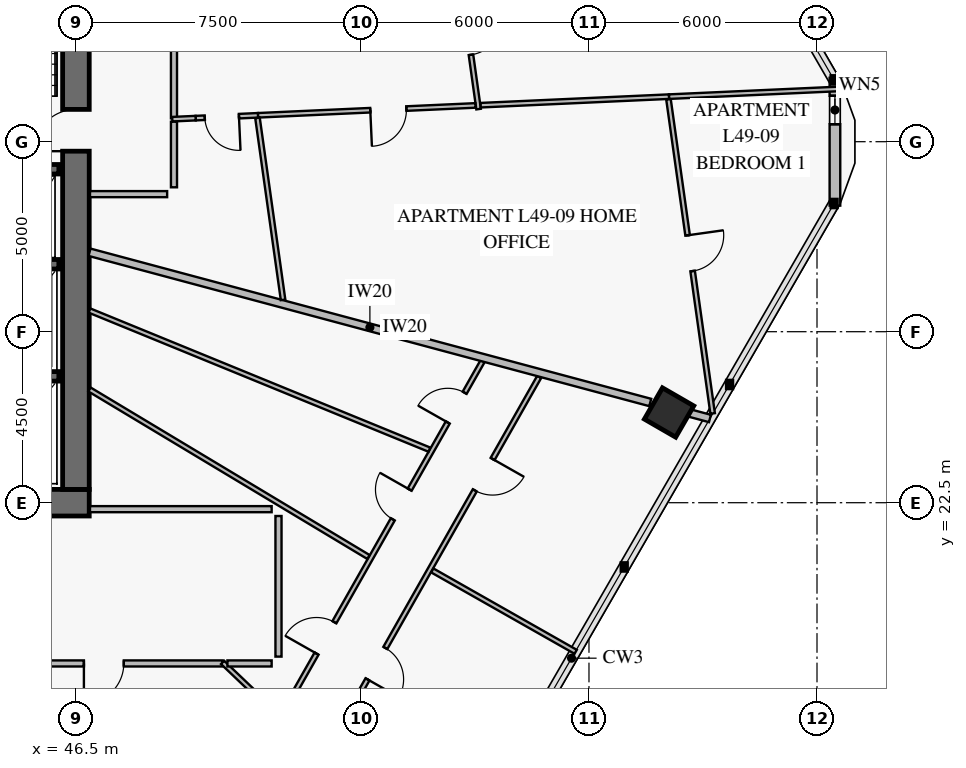
"""IFC4 building model, lengths in metres.
Left out: names, types, materials, properties, quantities, classifications, styles, units other than length and angle.
Written with IfcOpenShell. Run it as: python <this file> out.ifc"""

import sys

from ifc_helpers import new_model, si_unit, direction, frame, frame_2d, origin, origin_2d, place, context, subcontext, project, spatial, rectangle, extrude, element, fill, save


model = new_model("IFC4")
c1 = context("Model", 3, precision=1e-05, world=origin(), true_north=direction((0.0, 1.0)))
c2 = subcontext(c1, "Body", "Model", "MODEL_VIEW")
j1 = project(units=[si_unit("LENGTHUNIT", "METRE"), si_unit("PLANEANGLEUNIT", "RADIAN")], contexts=[c1])
p1 = place(None, origin())
s1 = spatial("IfcSite", under=j1, at=p1, CompositionType="ELEMENT")
p2 = place(p1, origin())
s2 = spatial("IfcBuilding", under=s1, at=p2, CompositionType="ELEMENT")
p3 = place(p2, frame((0.0, 0.0, 196.0)))
s3 = spatial("IfcBuildingStorey", under=s2, at=p3, CompositionType="ELEMENT", Elevation=196.0)
p4 = place(p3, frame((37.35, 22.5, 0.0), z_axis=(0.0, 0.0, 1.0), x_axis=(1.0, 0.0, 0.0)))
e1 = element("IfcWall", 1, at=p4, inside=s3, PredefinedType="SHEAR", context=c2, shape_type="SweptSolid", body=[
    extrude(rectangle(XDim=9.5, YDim=0.7, at=frame_2d((4.75, 0.0))), origin(), (0.0, 0.0, 1.0), 3.8),
])
p5 = place(p4, frame((3.95, 0.0, 0.0)))
e2 = element("IfcOpeningElement", 2, at=p5, cuts=e1, PredefinedType="OPENING", context=c2, shape_type="SweptSolid", body=[
    extrude(rectangle(XDim=1.5, YDim=2.15, at=frame_2d((0.75, 1.075))), frame((0.0, 0.362, 0.0), z_axis=(0.0, -1.0, 0.0), x_axis=(1.0, 0.0, 0.0)), (0.0, 0.0, 1.0), 0.724),
])
p6 = place(p3, frame((46.5, 22.85, 0.0), z_axis=(0.0, 0.0, 1.0), x_axis=(0.0, 1.0, 0.0)))
e3 = element("IfcWall", 3, at=p6, inside=s3, PredefinedType="SHEAR", context=c2, shape_type="SweptSolid", body=[
    extrude(rectangle(XDim=18.3, YDim=0.7, at=frame_2d((9.15, 0.0))), origin(), (0.0, 0.0, 1.0), 3.8),
])
p7 = place(p6, frame((8.9, 0.0, 0.0)))
e4 = element("IfcOpeningElement", 4, at=p7, cuts=e3, PredefinedType="OPENING", context=c2, shape_type="SweptSolid", body=[
    extrude(rectangle(XDim=1.1, YDim=2.15, at=frame_2d((0.55, 1.075))), frame((0.0, 0.362, 0.0), z_axis=(0.0, -1.0, 0.0), x_axis=(1.0, 0.0, 0.0)), (0.0, 0.0, 1.0), 0.724),
])
p8 = place(p3, frame((62.108, 24.874, 0.0), z_axis=(0.0, 0.0, 1.0), x_axis=(0.5, 0.866025403784, 0.0)))
e5 = element("IfcColumn", 5, at=p8, inside=s3, PredefinedType="COLUMN", context=c2, shape_type="SweptSolid", body=[
    extrude(rectangle(XDim=0.95, YDim=0.95, at=origin_2d()), origin(), (0.0, 0.0, 1.0), 3.55),
])
p9 = place(p3, frame((66.472, 33.683, 0.0), z_axis=(0.0, 0.0, 1.0), x_axis=(0.0, -1.0, 0.0)))
e6 = element("IfcWall", 6, at=p9, inside=s3, PredefinedType="SOLIDWALL", context=c2, shape_type="SweptSolid", body=[
    extrude(rectangle(XDim=3.365, YDim=0.28, at=frame_2d((1.683, 0.0))), origin(), (0.0, 0.0, 1.0), 3.55),
])
p10 = place(p9, frame((0.473, 0.0, 0.85)))
e7 = element("IfcOpeningElement", 7, at=p10, cuts=e6, PredefinedType="OPENING", context=c2, shape_type="SweptSolid", body=[
    extrude(rectangle(XDim=0.75, YDim=1.5, at=frame_2d((0.375, 0.75))), frame((0.0, 0.152, 0.0), z_axis=(0.0, -1.0, 0.0), x_axis=(1.0, 0.0, 0.0)), (0.0, 0.0, 1.0), 0.304),
])
p11 = place(p3, frame((25.95, 31.275, 0.0), z_axis=(0.0, 0.0, 1.0), x_axis=(1.0, 0.0, 0.0)))
e8 = element("IfcWall", 8, at=p11, inside=s3, PredefinedType="SOLIDWALL", context=c2, shape_type="SweptSolid", body=[
    extrude(rectangle(XDim=20.1, YDim=0.25, at=frame_2d((10.05, 0.0))), origin(), (0.0, 0.0, 1.0), 3.8),
])
p12 = place(p11, frame((2.6, 0.0, 0.0)))
e9 = element("IfcOpeningElement", 9, at=p12, cuts=e8, PredefinedType="OPENING", context=c2, shape_type="SweptSolid", body=[
    extrude(rectangle(XDim=1.1, YDim=2.15, at=frame_2d((0.55, 1.075))), frame((0.0, 0.137, 0.0), z_axis=(0.0, -1.0, 0.0), x_axis=(1.0, 0.0, 0.0)), (0.0, 0.0, 1.0), 0.274),
])
p13 = place(p11, frame((10.6, 0.0, 0.0)))
e10 = element("IfcOpeningElement", 10, at=p13, cuts=e8, PredefinedType="OPENING", context=c2, shape_type="SweptSolid", body=[
    extrude(rectangle(XDim=1.1, YDim=2.15, at=frame_2d((0.55, 1.075))), frame((0.0, 0.137, 0.0), z_axis=(0.0, -1.0, 0.0), x_axis=(1.0, 0.0, 0.0)), (0.0, 0.0, 1.0), 0.274),
])
p14 = place(p11, frame((16.35, 0.0, 0.0)))
e11 = element("IfcOpeningElement", 11, at=p14, cuts=e8, PredefinedType="OPENING", context=c2, shape_type="SweptSolid", body=[
    extrude(rectangle(XDim=1.1, YDim=2.15, at=frame_2d((0.55, 1.075))), frame((0.0, 0.137, 0.0), z_axis=(0.0, -1.0, 0.0), x_axis=(1.0, 0.0, 0.0)), (0.0, 0.0, 1.0), 0.274),
])
for number, where, z_axis, x_axis in (
    (12, (43.8, 25.825, 0.0), (0.0, 0.0, 1.0), (1.0, 0.0, 0.0)),
    (13, (43.8, 28.775, 0.0), (0.0, 0.0, 1.0), (1.0, 0.0, 0.0)),
):
    element("IfcWall", number, at=place(p3, frame(where, z_axis=z_axis, x_axis=x_axis)), inside=s3, PredefinedType="SOLIDWALL", context=c2, shape_type="SweptSolid", body=[
        extrude(rectangle(XDim=2.25, YDim=0.25, at=frame_2d((1.125, 0.0))), origin(), (0.0, 0.0, 1.0), 3.8),
    ])
p15 = place(p3, frame((51.827, 16.758, 0.0), z_axis=(0.0, 0.0, 1.0), x_axis=(0.493634405262, 0.869669519957, 0.0)))
e14 = element("IfcWall", 14, at=p15, inside=s3, PredefinedType="PARTITIONING", context=c2, shape_type="SweptSolid", body=[
    extrude(rectangle(XDim=10.885, YDim=0.12, at=frame_2d((5.442, 0.0))), origin(), (0.0, 0.0, 1.0), 2.9),
])
p16 = place(p15, frame((2.036, 0.0, 0.0)))
e15 = element("IfcOpeningElement", 15, at=p16, cuts=e14, PredefinedType="OPENING", context=c2, shape_type="SweptSolid", body=[
    extrude(rectangle(XDim=0.95, YDim=2.1, at=frame_2d((0.475, 1.05))), frame((0.0, 0.072, 0.0), z_axis=(0.0, -1.0, 0.0), x_axis=(1.0, 0.0, 0.0)), (0.0, 0.0, 1.0), 0.144),
])
p17 = place(p15, frame((6.098, 0.0, 0.0)))
e16 = element("IfcOpeningElement", 16, at=p17, cuts=e14, PredefinedType="OPENING", context=c2, shape_type="SweptSolid", body=[
    extrude(rectangle(XDim=0.9, YDim=2.1, at=frame_2d((0.45, 1.05))), frame((0.0, 0.072, 0.0), z_axis=(0.0, -1.0, 0.0), x_axis=(1.0, 0.0, 0.0)), (0.0, 0.0, 1.0), 0.144),
])
p18 = place(p15, frame((9.029, 0.0, 0.0)))
e17 = element("IfcOpeningElement", 17, at=p18, cuts=e14, PredefinedType="OPENING", context=c2, shape_type="SweptSolid", body=[
    extrude(rectangle(XDim=0.9, YDim=2.1, at=frame_2d((0.45, 1.05))), frame((0.0, 0.072, 0.0), z_axis=(0.0, -1.0, 0.0), x_axis=(1.0, 0.0, 0.0)), (0.0, 0.0, 1.0), 0.144),
])
p19 = place(p3, frame((52.946, 15.691, 0.0), z_axis=(0.0, 0.0, 1.0), x_axis=(0.493647118533, 0.869662303635, 0.0)))
e18 = element("IfcWall", 18, at=p19, inside=s3, PredefinedType="PARTITIONING", context=c2, shape_type="SweptSolid", body=[
    extrude(rectangle(XDim=11.637, YDim=0.12, at=frame_2d((5.819, 0.0))), origin(), (0.0, 0.0, 1.0), 2.9),
])
p20 = place(p19, frame((2.484, 0.0, 0.0)))
e19 = element("IfcOpeningElement", 19, at=p20, cuts=e18, PredefinedType="OPENING", context=c2, shape_type="SweptSolid", body=[
    extrude(rectangle(XDim=0.95, YDim=2.1, at=frame_2d((0.475, 1.05))), frame((0.0, 0.072, 0.0), z_axis=(0.0, -1.0, 0.0), x_axis=(1.0, 0.0, 0.0)), (0.0, 0.0, 1.0), 0.144),
])
p21 = place(p19, frame((8.203, 0.0, 0.0)))
e20 = element("IfcOpeningElement", 20, at=p21, cuts=e18, PredefinedType="OPENING", context=c2, shape_type="SweptSolid", body=[
    extrude(rectangle(XDim=0.95, YDim=2.1, at=frame_2d((0.475, 1.05))), frame((0.0, 0.072, 0.0), z_axis=(0.0, -1.0, 0.0), x_axis=(1.0, 0.0, 0.0)), (0.0, 0.0, 1.0), 0.144),
])
p22 = place(p3, frame((44.111, 18.27, 0.0), z_axis=(0.0, 0.0, 1.0), x_axis=(1.0, 0.0, 0.0)))
e21 = element("IfcWall", 21, at=p22, inside=s3, PredefinedType="PARTITIONING", context=c2, shape_type="SweptSolid", body=[
    extrude(rectangle(XDim=6.248, YDim=0.16, at=frame_2d((3.124, 0.0))), origin(), (0.0, 0.0, 1.0), 2.9),
])
p23 = place(p22, frame((2.599, 0.0, 0.0)))
e22 = element("IfcOpeningElement", 22, at=p23, cuts=e21, PredefinedType="OPENING", context=c2, shape_type="SweptSolid", body=[
    extrude(rectangle(XDim=1.05, YDim=2.15, at=frame_2d((0.525, 1.075))), frame((0.0, 0.092, 0.0), z_axis=(0.0, -1.0, 0.0), x_axis=(1.0, 0.0, 0.0)), (0.0, 0.0, 1.0), 0.184),
])
p24 = place(p3, frame((57.095, 32.858, 0.0), z_axis=(0.0, 0.0, 1.0), x_axis=(-0.13917519047, 0.990267775078, 0.0)))
e23 = element("IfcWall", 23, at=p24, inside=s3, PredefinedType="PARTITIONING", context=c2, shape_type="SweptSolid", body=[
    extrude(rectangle(XDim=10.897, YDim=0.12, at=frame_2d((5.448, 0.0))), origin(), (0.0, 0.0, 1.0), 2.9),
])
p25 = place(p24, frame((1.443, 0.0, 0.0)))
e24 = element("IfcOpeningElement", 24, at=p25, cuts=e23, PredefinedType="OPENING", context=c2, shape_type="SweptSolid", body=[
    extrude(rectangle(XDim=0.95, YDim=2.1, at=frame_2d((0.475, 1.05))), frame((0.0, 0.072, 0.0), z_axis=(0.0, -1.0, 0.0), x_axis=(1.0, 0.0, 0.0)), (0.0, 0.0, 1.0), 0.144),
])
p26 = place(p24, frame((6.651, 0.0, 0.0)))
e25 = element("IfcOpeningElement", 25, at=p26, cuts=e23, PredefinedType="OPENING", context=c2, shape_type="SweptSolid", body=[
    extrude(rectangle(XDim=0.95, YDim=2.1, at=frame_2d((0.475, 1.05))), frame((0.0, 0.072, 0.0), z_axis=(0.0, -1.0, 0.0), x_axis=(1.0, 0.0, 0.0)), (0.0, 0.0, 1.0), 0.144),
])
p27 = place(p3, frame((49.65, 32.62, 0.0), z_axis=(0.0, 0.0, 1.0), x_axis=(0.998968234181, 0.045414393056, 0.0)))
e26 = element("IfcWall", 26, at=p27, inside=s3, PredefinedType="PARTITIONING", context=c2, shape_type="SweptSolid", body=[
    extrude(rectangle(XDim=1.645, YDim=0.12, at=frame_2d((0.823, 0.0))), origin(), (0.0, 0.0, 1.0), 3.55),
])
p28 = place(p27, frame((0.241, 0.0, 0.0)))
e27 = element("IfcOpeningElement", 27, at=p28, cuts=e26, PredefinedType="OPENING", context=c2, shape_type="SweptSolid", body=[
    extrude(rectangle(XDim=0.9, YDim=2.1, at=frame_2d((0.45, 1.05))), frame((0.0, 0.072, 0.0), z_axis=(0.0, -1.0, 0.0), x_axis=(1.0, 0.0, 0.0)), (0.0, 0.0, 1.0), 0.144),
])
p29 = place(p3, frame((51.293, 32.695, 0.0), z_axis=(0.0, 0.0, 1.0), x_axis=(0.99897231705, 0.045324494132, 0.0)))
e28 = element("IfcWall", 28, at=p29, inside=s3, PredefinedType="PARTITIONING", context=c2, shape_type="SweptSolid", body=[
    extrude(rectangle(XDim=5.726, YDim=0.12, at=frame_2d((2.863, 0.0))), origin(), (0.0, 0.0, 1.0), 3.55),
])
p30 = place(p29, frame((2.955, 0.0, 0.0)))
e29 = element("IfcOpeningElement", 29, at=p30, cuts=e28, PredefinedType="OPENING", context=c2, shape_type="SweptSolid", body=[
    extrude(rectangle(XDim=0.95, YDim=2.1, at=frame_2d((0.475, 1.05))), frame((0.0, 0.072, 0.0), z_axis=(0.0, -1.0, 0.0), x_axis=(1.0, 0.0, 0.0)), (0.0, 0.0, 1.0), 0.144),
])
p31 = place(p3, frame((57.15, 32.96, 0.0), z_axis=(0.0, 0.0, 1.0), x_axis=(0.998970871776, 0.04535633741, 0.0)))
e30 = element("IfcWall", 30, at=p31, inside=s3, PredefinedType="PARTITIONING", context=c2, shape_type="SweptSolid", body=[
    extrude(rectangle(XDim=4.963, YDim=0.12, at=frame_2d((2.481, 0.0))), origin(), (0.0, 0.0, 1.0), 2.87),
])
p32 = place(p3, frame((63.254, 24.848, 0.0), z_axis=(0.0, 0.0, 1.0), x_axis=(-0.139181804835, 0.990266845453, 0.0)))
e31 = element("IfcWall", 31, at=p32, inside=s3, PredefinedType="PARTITIONING", context=c2, shape_type="SweptSolid", body=[
    extrude(rectangle(XDim=8.35, YDim=0.12, at=frame_2d((4.175, 0.0))), origin(), (0.0, 0.0, 1.0), 2.87),
])
p33 = place(p32, frame((3.784, 0.0, 0.0)))
e32 = element("IfcOpeningElement", 32, at=p33, cuts=e31, PredefinedType="OPENING", context=c2, shape_type="SweptSolid", body=[
    extrude(rectangle(XDim=0.95, YDim=2.1, at=frame_2d((0.475, 1.05))), frame((0.0, 0.072, 0.0), z_axis=(0.0, -1.0, 0.0), x_axis=(1.0, 0.0, 0.0)), (0.0, 0.0, 1.0), 0.144),
])
p34 = place(p3, frame((49.08, 32.614, 0.0), z_axis=(0.0, 0.0, 1.0), x_axis=(0.0, 1.0, 0.0)))
e33 = element("IfcWall", 33, at=p34, inside=s3, PredefinedType="PARTITIONING", context=c2, shape_type="SweptSolid", body=[
    extrude(rectangle(XDim=7.067, YDim=0.16, at=frame_2d((3.534, 0.0))), origin(), (0.0, 0.0, 1.0), 2.9),
])
p35 = place(p34, frame((3.009, 0.0, 0.0)))
e34 = element("IfcOpeningElement", 34, at=p35, cuts=e33, PredefinedType="OPENING", context=c2, shape_type="SweptSolid", body=[
    extrude(rectangle(XDim=1.05, YDim=2.15, at=frame_2d((0.525, 1.075))), frame((0.0, 0.092, 0.0), z_axis=(0.0, -1.0, 0.0), x_axis=(1.0, 0.0, 0.0)), (0.0, 0.0, 1.0), 0.184),
])
p36 = place(p3, frame((43.904, 18.31, 0.0), z_axis=(0.0, 0.0, 1.0), x_axis=(0.500007038605, -0.866021340006, 0.0)))
e35 = element("IfcWall", 35, at=p36, inside=s3, PredefinedType="PARTITIONING", context=c2, shape_type="SweptSolid", body=[
    extrude(rectangle(XDim=15.05, YDim=0.2, at=frame_2d((7.525, 0.0))), origin(), (0.0, 0.0, 1.0), 2.87),
])
p37 = place(p3, frame((46.858, 25.479, 0.0), z_axis=(0.0, 0.0, 1.0), x_axis=(0.857273931948, -0.514860569089, 0.0)))
e36 = element("IfcWall", 36, at=p37, inside=s3, PredefinedType="PARTITIONING", context=c2, shape_type="SweptSolid", body=[
    extrude(rectangle(XDim=8.561, YDim=0.12, at=frame_2d((4.281, 0.0))), origin(), (0.0, 0.0, 1.0), 3.15),
])
p38 = place(p3, frame((46.858, 27.556, 0.0), z_axis=(0.0, 0.0, 1.0), x_axis=(0.925490196585, -0.378771561795, 0.0)))
e37 = element("IfcWall", 37, at=p38, inside=s3, PredefinedType="PARTITIONING", context=c2, shape_type="SweptSolid", body=[
    extrude(rectangle(XDim=9.663, YDim=0.12, at=frame_2d((4.831, 0.0))), origin(), (0.0, 0.0, 1.0), 3.15),
])
p39 = place(p3, frame((55.877, 20.717, 0.0), z_axis=(0.0, 0.0, 1.0), x_axis=(0.869673507185, -0.493627380623, 0.0)))
e38 = element("IfcWall", 38, at=p39, inside=s3, PredefinedType="PARTITIONING", context=c2, shape_type="SweptSolid", body=[
    extrude(rectangle(XDim=4.337, YDim=0.12, at=frame_2d((2.169, 0.0))), origin(), (0.0, 0.0, 1.0), 2.87),
])
p40 = place(p3, frame((50.359, 18.298, 0.0), z_axis=(0.0, 0.0, 1.0), x_axis=(0.723451106681, -0.690375619675, 0.0)))
e39 = element("IfcWall", 39, at=p40, inside=s3, PredefinedType="PARTITIONING", context=c2, shape_type="SweptSolid", body=[
    extrude(rectangle(XDim=2.03, YDim=0.12, at=frame_2d((1.015, 0.0))), origin(), (0.0, 0.0, 1.0), 3.15),
])
p41 = place(p3, frame((46.858, 29.091, 0.0), z_axis=(0.0, 0.0, 1.0), x_axis=(0.965927861862, -0.25881144812, 0.0)))
e40 = element("IfcWall", 40, at=p41, inside=s3, PredefinedType="PARTITIONING", context=c2, shape_type="SweptSolid", body=[
    extrude(rectangle(XDim=15.275, YDim=0.2, at=frame_2d((7.638, 0.0))), origin(), (0.0, 0.0, 1.0), 2.9),
])
p42 = place(p3, frame((62.603, 24.872, 0.0), z_axis=(0.0, 0.0, 1.0), x_axis=(0.965944425699, -0.258749621182, 0.0)))
e41 = element("IfcWall", 41, at=p42, inside=s3, PredefinedType="PARTITIONING", context=c2, shape_type="SweptSolid", body=[
    extrude(rectangle(XDim=0.601, YDim=0.2, at=frame_2d((0.301, 0.0))), origin(), (0.0, 0.0, 1.0), 3.55),
])
p43 = place(p3, frame((49.035, 32.592, 0.0), z_axis=(0.0, 0.0, 1.0), x_axis=(0.998959526244, 0.045605536133, 0.0)))
e42 = element("IfcWall", 42, at=p43, inside=s3, PredefinedType="PARTITIONING", context=c2, shape_type="SweptSolid", body=[
    extrude(rectangle(XDim=0.616, YDim=0.12, at=frame_2d((0.308, 0.0))), origin(), (0.0, 0.0, 1.0), 3.55),
])
p44 = place(p3, frame((62.107, 33.186, 0.0), z_axis=(0.0, 0.0, 1.0), x_axis=(0.998971026313, 0.045352933617, 0.0)))
e43 = element("IfcWall", 43, at=p44, inside=s3, PredefinedType="PARTITIONING", context=c2, shape_type="SweptSolid", body=[
    extrude(rectangle(XDim=4.452, YDim=0.12, at=frame_2d((2.226, 0.0))), origin(), (0.0, 0.0, 1.0), 2.87),
])
p45 = place(p3, frame((51.95, 27.838, 0.0), z_axis=(0.0, 0.0, 1.0), x_axis=(-0.139165856078, 0.990269086916, 0.0)))
e44 = element("IfcWall", 44, at=p45, inside=s3, PredefinedType="PARTITIONING", context=c2, shape_type="SweptSolid", body=[
    extrude(rectangle(XDim=4.835, YDim=0.12, at=frame_2d((2.417, 0.0))), origin(), (0.0, 0.0, 1.0), 3.55),
])
p46 = place(p3, frame((51.65, 22.33, 0.0), z_axis=(0.0, 0.0, 1.0), x_axis=(-1.0, 0.0, 0.0)))
e45 = element("IfcWall", 45, at=p46, inside=s3, PredefinedType="PARTITIONING", context=c2, shape_type="SweptSolid", body=[
    extrude(rectangle(XDim=4.78, YDim=0.16, at=frame_2d((2.39, 0.0))), origin(), (0.0, 0.0, 1.0), 3.55),
])
p47 = place(p3, frame((51.83, 18.45, 0.0), z_axis=(0.0, 0.0, 1.0), x_axis=(0.0, 1.0, 0.0)))
e46 = element("IfcWall", 46, at=p47, inside=s3, PredefinedType="PARTITIONING", context=c2, shape_type="SweptSolid", body=[
    extrude(rectangle(XDim=3.7, YDim=0.16, at=frame_2d((1.85, 0.0))), origin(), (0.0, 0.0, 1.0), 3.15),
])
p48 = place(p3, frame((50.486, 18.27, 0.0), z_axis=(0.0, 0.0, 1.0), x_axis=(1.0, 0.0, 0.0)))
e47 = element("IfcWall", 47, at=p48, inside=s3, PredefinedType="PARTITIONING", context=c2, shape_type="SweptSolid", body=[
    extrude(rectangle(XDim=1.164, YDim=0.16, at=frame_2d((0.582, 0.0))), origin(), (0.0, 0.0, 1.0), 3.15),
])
p49 = place(p3, frame((46.87, 30.62, 0.0), z_axis=(0.0, 0.0, 1.0), x_axis=(1.0, 0.0, 0.0)))
e48 = element("IfcWall", 48, at=p49, inside=s3, PredefinedType="PARTITIONING", context=c2, shape_type="SweptSolid", body=[
    extrude(rectangle(XDim=2.03, YDim=0.16, at=frame_2d((1.015, 0.0))), origin(), (0.0, 0.0, 1.0), 3.55),
])
p50 = place(p3, frame((49.08, 30.8, 0.0), z_axis=(0.0, 0.0, 1.0), x_axis=(0.0, 1.0, 0.0)))
e49 = element("IfcWall", 49, at=p50, inside=s3, PredefinedType="PARTITIONING", context=c2, shape_type="SweptSolid", body=[
    extrude(rectangle(XDim=1.726, YDim=0.16, at=frame_2d((0.863, 0.0))), origin(), (0.0, 0.0, 1.0), 3.55),
])
p51 = place(p10, origin())
e50 = element("IfcWindow", 50, at=p51, inside=s3, PartitioningType="SINGLE_PANEL", PredefinedType="WINDOW", context=c2, shape_type="SweptSolid", body=[
    extrude(rectangle(XDim=0.75, YDim=1.5, at=frame_2d((0.375, 0.75))), frame((0.0, 0.03, 0.0), z_axis=(0.0, -1.0, 0.0), x_axis=(1.0, 0.0, 0.0)), (0.0, 0.0, 1.0), 0.06),
])
fill(e7, e50)
p52 = place(p7, origin())
e51 = element("IfcDoor", 51, at=p52, inside=s3, OperationType="SINGLE_SWING_LEFT", PredefinedType="USERDEFINED", context=c2, shape_type="SweptSolid", body=[
    extrude(rectangle(XDim=1.1, YDim=2.15, at=frame_2d((0.55, 1.075))), frame((0.0, 0.025, 0.0), z_axis=(0.0, -1.0, 0.0), x_axis=(1.0, 0.0, 0.0)), (0.0, 0.0, 1.0), 0.05),
])
fill(e4, e51)
p53 = place(p16, origin())
e52 = element("IfcDoor", 52, at=p53, inside=s3, OperationType="SINGLE_SWING_LEFT", PredefinedType="DOOR", context=c2, shape_type="SweptSolid", body=[
    extrude(rectangle(XDim=0.95, YDim=2.1, at=frame_2d((0.475, 1.05))), frame((0.0, 0.025, 0.0), z_axis=(0.0, -1.0, 0.0), x_axis=(1.0, 0.0, 0.0)), (0.0, 0.0, 1.0), 0.05),
])
fill(e15, e52)
p54 = place(p17, origin())
e53 = element("IfcDoor", 53, at=p54, inside=s3, OperationType="SINGLE_SWING_RIGHT", PredefinedType="DOOR", context=c2, shape_type="SweptSolid", body=[
    extrude(rectangle(XDim=0.9, YDim=2.1, at=frame_2d((0.45, 1.05))), frame((0.0, 0.025, 0.0), z_axis=(0.0, -1.0, 0.0), x_axis=(1.0, 0.0, 0.0)), (0.0, 0.0, 1.0), 0.05),
])
fill(e16, e53)
p55 = place(p18, origin())
e54 = element("IfcDoor", 54, at=p55, inside=s3, OperationType="SINGLE_SWING_LEFT", PredefinedType="DOOR", context=c2, shape_type="SweptSolid", body=[
    extrude(rectangle(XDim=0.9, YDim=2.1, at=frame_2d((0.45, 1.05))), frame((0.0, 0.025, 0.0), z_axis=(0.0, -1.0, 0.0), x_axis=(1.0, 0.0, 0.0)), (0.0, 0.0, 1.0), 0.05),
])
fill(e17, e54)
p56 = place(p20, frame((0.95, 0.0, 0.0), z_axis=(0.0, 0.0, 1.0), x_axis=(-1.0, 0.0, 0.0)))
e55 = element("IfcDoor", 55, at=p56, inside=s3, OperationType="SINGLE_SWING_RIGHT", PredefinedType="DOOR", context=c2, shape_type="SweptSolid", body=[
    extrude(rectangle(XDim=0.95, YDim=2.1, at=frame_2d((0.475, 1.05))), frame((0.0, 0.025, 0.0), z_axis=(0.0, -1.0, 0.0), x_axis=(1.0, 0.0, 0.0)), (0.0, 0.0, 1.0), 0.05),
])
fill(e19, e55)
p57 = place(p21, frame((0.95, 0.0, 0.0), z_axis=(0.0, 0.0, 1.0), x_axis=(-1.0, 0.0, 0.0)))
e56 = element("IfcDoor", 56, at=p57, inside=s3, OperationType="SINGLE_SWING_LEFT", PredefinedType="DOOR", context=c2, shape_type="SweptSolid", body=[
    extrude(rectangle(XDim=0.95, YDim=2.1, at=frame_2d((0.475, 1.05))), frame((0.0, 0.025, 0.0), z_axis=(0.0, -1.0, 0.0), x_axis=(1.0, 0.0, 0.0)), (0.0, 0.0, 1.0), 0.05),
])
fill(e20, e56)
p58 = place(p23, frame((1.05, 0.0, 0.0), z_axis=(0.0, 0.0, 1.0), x_axis=(-1.0, 0.0, 0.0)))
e57 = element("IfcDoor", 57, at=p58, inside=s3, OperationType="SINGLE_SWING_RIGHT", PredefinedType="DOOR", context=c2, shape_type="SweptSolid", body=[
    extrude(rectangle(XDim=1.05, YDim=2.15, at=frame_2d((0.525, 1.075))), frame((0.0, 0.025, 0.0), z_axis=(0.0, -1.0, 0.0), x_axis=(1.0, 0.0, 0.0)), (0.0, 0.0, 1.0), 0.05),
])
fill(e22, e57)
p59 = place(p25, frame((0.95, 0.0, 0.0), z_axis=(0.0, 0.0, 1.0), x_axis=(-1.0, 0.0, 0.0)))
e58 = element("IfcDoor", 58, at=p59, inside=s3, OperationType="SINGLE_SWING_LEFT", PredefinedType="DOOR", context=c2, shape_type="SweptSolid", body=[
    extrude(rectangle(XDim=0.95, YDim=2.1, at=frame_2d((0.475, 1.05))), frame((0.0, 0.025, 0.0), z_axis=(0.0, -1.0, 0.0), x_axis=(1.0, 0.0, 0.0)), (0.0, 0.0, 1.0), 0.05),
])
fill(e24, e58)
p60 = place(p28, frame((0.9, 0.0, 0.0), z_axis=(0.0, 0.0, 1.0), x_axis=(-1.0, 0.0, 0.0)))
e59 = element("IfcDoor", 59, at=p60, inside=s3, OperationType="SINGLE_SWING_LEFT", PredefinedType="DOOR", context=c2, shape_type="SweptSolid", body=[
    extrude(rectangle(XDim=0.9, YDim=2.1, at=frame_2d((0.45, 1.05))), frame((0.0, 0.025, 0.0), z_axis=(0.0, -1.0, 0.0), x_axis=(1.0, 0.0, 0.0)), (0.0, 0.0, 1.0), 0.05),
])
fill(e27, e59)
p61 = place(p30, frame((0.95, 0.0, 0.0), z_axis=(0.0, 0.0, 1.0), x_axis=(-1.0, 0.0, 0.0)))
e60 = element("IfcDoor", 60, at=p61, inside=s3, OperationType="SINGLE_SWING_RIGHT", PredefinedType="DOOR", context=c2, shape_type="SweptSolid", body=[
    extrude(rectangle(XDim=0.95, YDim=2.1, at=frame_2d((0.475, 1.05))), frame((0.0, 0.025, 0.0), z_axis=(0.0, -1.0, 0.0), x_axis=(1.0, 0.0, 0.0)), (0.0, 0.0, 1.0), 0.05),
])
fill(e29, e60)
p62 = place(p33, frame((0.95, 0.0, 0.0), z_axis=(0.0, 0.0, 1.0), x_axis=(-1.0, 0.0, 0.0)))
e61 = element("IfcDoor", 61, at=p62, inside=s3, OperationType="SINGLE_SWING_LEFT", PredefinedType="DOOR", context=c2, shape_type="SweptSolid", body=[
    extrude(rectangle(XDim=0.95, YDim=2.1, at=frame_2d((0.475, 1.05))), frame((0.0, 0.025, 0.0), z_axis=(0.0, -1.0, 0.0), x_axis=(1.0, 0.0, 0.0)), (0.0, 0.0, 1.0), 0.05),
])
fill(e32, e61)
save(model, sys.argv[1])
